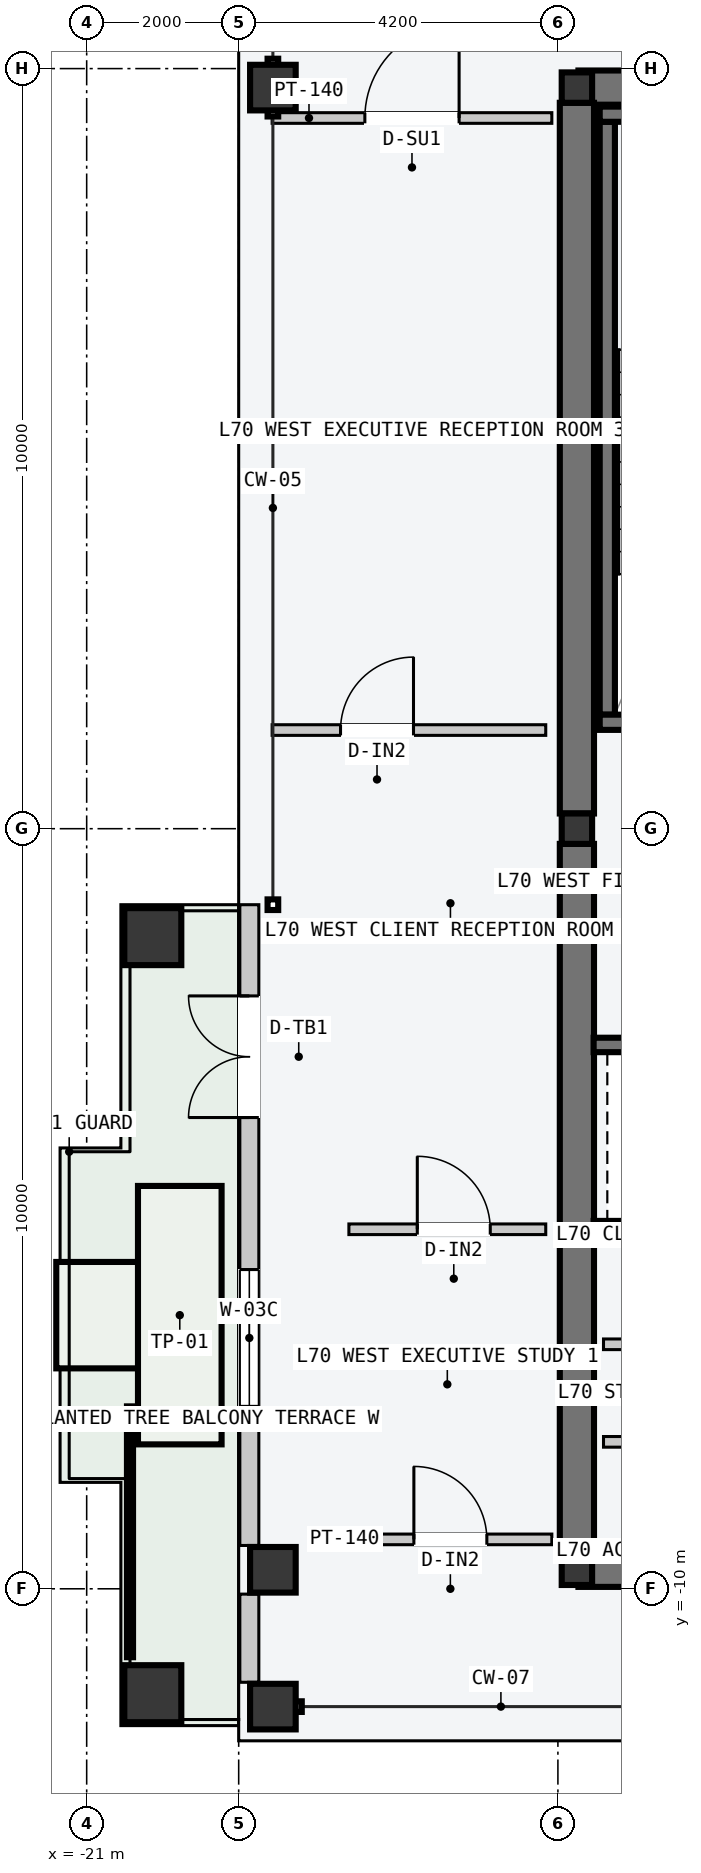
"""IFC4 building model, lengths in metres.
Left out: names, types, materials, properties, quantities, classifications, styles, units other than length and angle.
Written with IfcOpenShell. Run it as: python <this file> out.ifc"""

import sys

from ifc_helpers import new_model, si_unit, direction, frame, frame_2d, origin, origin_2d, place, context, subcontext, project, spatial, rectangle, hollow_rectangle, i_section, extrude, element, fill, save


model = new_model("IFC4")
c1 = context("Model", 3, precision=1e-05, world=origin(), true_north=direction((0.0, 1.0)))
c2 = subcontext(c1, "Body", "Model", "MODEL_VIEW")
j1 = project(units=[si_unit("LENGTHUNIT", "METRE"), si_unit("PLANEANGLEUNIT", "RADIAN")], contexts=[c1])
p1 = place(None, origin())
s1 = spatial("IfcSite", under=j1, at=p1, CompositionType="ELEMENT")
p2 = place(p1, origin())
s2 = spatial("IfcBuilding", under=s1, at=p2, CompositionType="ELEMENT")
p3 = place(p2, frame((0.0, 0.0, 265.2)))
s3 = spatial("IfcBuildingStorey", under=s2, at=p3, CompositionType="ELEMENT", Elevation=265.2)
for number, where, z_axis, x_axis in (
    (1, (-14.53, -9.75, -0.2), (0.0, 0.0, 1.0), (1.0, 0.0, 0.0)),
    (2, (-14.53, 9.75, -0.2), (0.0, 0.0, 1.0), (1.0, 0.0, 0.0)),
):
    element("IfcWall", number, at=place(p3, frame(where, z_axis=z_axis, x_axis=x_axis)), inside=s3, PredefinedType="SHEAR", context=c2, shape_type="SweptSolid", body=[
        extrude(rectangle(XDim=6.46, YDim=0.45, at=frame_2d((3.23, 0.0))), origin(), (0.0, 0.0, 1.0), 3.6),
    ])
for number, where, z_axis, x_axis in (
    (3, (-14.55, -9.55, -0.2), (0.0, 0.0, 1.0), (0.0, 1.0, 0.0)),
    (4, (-14.55, 0.2, -0.2), (0.0, 0.0, 1.0), (0.0, 1.0, 0.0)),
):
    element("IfcWall", number, at=place(p3, frame(where, z_axis=z_axis, x_axis=x_axis)), inside=s3, PredefinedType="SHEAR", context=c2, shape_type="SweptSolid", body=[
        extrude(rectangle(XDim=9.35, YDim=0.45, at=frame_2d((4.675, 0.0))), origin(), (0.0, 0.0, 1.0), 3.6),
    ])
p4 = place(p3, frame((-14.15, 1.5, -0.2), z_axis=(0.0, 0.0, 1.0), x_axis=(0.0, 1.0, 0.0)))
e5 = element("IfcWall", 5, at=p4, inside=s3, PredefinedType="SOLIDWALL", context=c2, shape_type="SweptSolid", body=[
    extrude(rectangle(XDim=7.8, YDim=0.2, at=frame_2d((3.9, 0.0))), origin(), (0.0, 0.0, 1.0), 3.6),
])
p5 = place(p3, frame((-14.25, 1.4, -0.2), z_axis=(0.0, 0.0, 1.0), x_axis=(1.0, 0.0, 0.0)))
e6 = element("IfcWall", 6, at=p5, inside=s3, PredefinedType="SOLIDWALL", context=c2, shape_type="SweptSolid", body=[
    extrude(rectangle(XDim=3.72, YDim=0.2, at=frame_2d((1.86, 0.0))), origin(), (0.0, 0.0, 1.0), 3.6),
])
p6 = place(p5, frame((1.5, 0.0, 0.2)))
e7 = element("IfcOpeningElement", 7, at=p6, cuts=e6, PredefinedType="OPENING", context=c2, shape_type="SweptSolid", body=[
    extrude(rectangle(XDim=1.12, YDim=2.18, at=frame_2d((0.56, 1.09))), frame((0.0, 0.11, 0.0), z_axis=(0.0, -1.0, 0.0), x_axis=(1.0, 0.0, 0.0)), (0.0, 0.0, 1.0), 0.22),
])
p7 = place(p3, frame((-14.25, 9.4, -0.2), z_axis=(0.0, 0.0, 1.0), x_axis=(1.0, 0.0, 0.0)))
e8 = element("IfcWall", 8, at=p7, inside=s3, PredefinedType="SOLIDWALL", context=c2, shape_type="SweptSolid", body=[
    extrude(rectangle(XDim=3.72, YDim=0.2, at=frame_2d((1.86, 0.0))), origin(), (0.0, 0.0, 1.0), 3.6),
])
for number, where, z_axis, x_axis in (
    (9, (-14.55, -9.75, 0.0), (0.0, 0.0, 1.0), (1.0, 0.0, 0.0)),
    (10, (-14.55, 0.0, 0.0), (0.0, 0.0, 1.0), (1.0, 0.0, 0.0)),
    (11, (-14.55, 9.75, 0.0), (0.0, 0.0, 1.0), (1.0, 0.0, 0.0)),
):
    element("IfcColumn", number, at=place(p3, frame(where, z_axis=z_axis, x_axis=x_axis)), inside=s3, PredefinedType="COLUMN", context=c2, shape_type="SweptSolid", body=[
        extrude(i_section(OverallWidth=0.4, OverallDepth=0.4, WebThickness=0.013, FlangeThickness=0.021, at=origin_2d()), origin(), (0.0, 0.0, 1.0), 3.6),
    ])
for number, where, z_axis, x_axis in (
    (12, (-18.55, -11.55, 0.0), (0.0, 0.0, 1.0), (0.0, 1.0, 0.0)),
    (13, (-18.55, -9.75, 0.0), (0.0, 0.0, 1.0), (0.0, 1.0, 0.0)),
    (14, (-18.55, 9.75, 0.0), (0.0, 0.0, 1.0), (0.0, 1.0, 0.0)),
):
    element("IfcColumn", number, at=place(p3, frame(where, z_axis=z_axis, x_axis=x_axis)), inside=s3, PredefinedType="COLUMN", context=c2, shape_type="SweptSolid", body=[
        extrude(hollow_rectangle(XDim=0.6, YDim=0.6, WallThickness=0.025, at=origin_2d()), origin(), (0.0, 0.0, 1.0), 3.6),
    ])
for number, where, z_axis, x_axis in (
    (15, (-20.13, -11.38, 0.0), (0.0, 0.0, 1.0), (0.0, 1.0, 0.0)),
    (16, (-20.13, -1.42, 0.0), (0.0, 0.0, 1.0), (0.0, 1.0, 0.0)),
):
    element("IfcColumn", number, at=place(p3, frame(where, z_axis=z_axis, x_axis=x_axis)), inside=s3, PredefinedType="COLUMN", context=c2, shape_type="SweptSolid", body=[
        extrude(hollow_rectangle(XDim=0.75, YDim=0.75, WallThickness=0.032, at=origin_2d()), origin(), (0.0, 0.0, 1.0), 3.6),
    ])
p8 = place(p3, frame((-18.86, -11.23, 0.0), z_axis=(0.0, 0.0, 1.0), x_axis=(0.0, 1.0, 0.0)))
e17 = element("IfcWall", 17, at=p8, inside=s3, PredefinedType="STANDARD", context=c2, shape_type="SweptSolid", body=[
    extrude(rectangle(XDim=1.16, YDim=0.25, at=frame_2d((0.58, 0.0))), origin(), (0.0, 0.0, 1.0), 3.4),
])
p9 = place(p3, frame((-18.86, -9.43, 0.0), z_axis=(0.0, 0.0, 1.0), x_axis=(0.0, 1.0, 0.0)))
e18 = element("IfcWall", 18, at=p9, inside=s3, PredefinedType="STANDARD", context=c2, shape_type="SweptSolid", body=[
    extrude(rectangle(XDim=8.43, YDim=0.25, at=frame_2d((4.215, 0.0))), origin(), (0.0, 0.0, 1.0), 3.4),
])
p10 = place(p9, frame((5.63, 0.0, 0.0)))
e19 = element("IfcOpeningElement", 19, at=p10, cuts=e18, PredefinedType="OPENING", context=c2, shape_type="SweptSolid", body=[
    extrude(rectangle(XDim=1.6, YDim=2.2, at=frame_2d((0.8, 1.1))), frame((0.0, 0.135, 0.0), z_axis=(0.0, -1.0, 0.0), x_axis=(1.0, 0.0, 0.0)), (0.0, 0.0, 1.0), 0.27),
])
p11 = place(p9, frame((1.83, 0.0, 0.85)))
e20 = element("IfcOpeningElement", 20, at=p11, cuts=e18, PredefinedType="OPENING", context=c2, shape_type="SweptSolid", body=[
    extrude(rectangle(XDim=1.8, YDim=2.05, at=frame_2d((0.9, 1.025))), frame((0.0, 0.135, 0.0), z_axis=(0.0, -1.0, 0.0), x_axis=(1.0, 0.0, 0.0)), (0.0, 0.0, 1.0), 0.27),
])
p12 = place(p3, frame((-14.33, -2.845, -0.2), z_axis=(0.0, 0.0, 1.0), x_axis=(1.0, 0.0, 0.0)))
e21 = element("IfcWall", 21, at=p12, inside=s3, PredefinedType="SOLIDWALL", context=c2, shape_type="SweptSolid", body=[
    extrude(rectangle(XDim=2.68, YDim=0.19, at=frame_2d((1.34, 0.0))), origin(), (0.0, 0.0, 1.0), 3.6),
])
p13 = place(p12, frame((0.83, 0.0, 0.2)))
e22 = element("IfcOpeningElement", 22, at=p13, cuts=e21, PredefinedType="OPENING", context=c2, shape_type="SweptSolid", body=[
    extrude(rectangle(XDim=1.2, YDim=2.2, at=frame_2d((0.6, 1.1))), frame((0.0, 0.105, 0.0), z_axis=(0.0, -1.0, 0.0), x_axis=(1.0, 0.0, 0.0)), (0.0, 0.0, 1.0), 0.21),
])
p14 = place(p3, frame((-14.33, -5.255, -0.2), z_axis=(0.0, 0.0, 1.0), x_axis=(1.0, 0.0, 0.0)))
e23 = element("IfcWall", 23, at=p14, inside=s3, PredefinedType="SOLIDWALL", context=c2, shape_type="SweptSolid", body=[
    extrude(rectangle(XDim=2.68, YDim=0.19, at=frame_2d((1.34, 0.0))), origin(), (0.0, 0.0, 1.0), 3.6),
])
for number, where, z_axis, x_axis in (
    (24, (-11.7, -8.067, 0.0), (0.0, 0.0, 1.0), (-1.0, 0.0, 0.0)),
    (25, (-11.7, -6.783, 0.0), (0.0, 0.0, 1.0), (-1.0, 0.0, 0.0)),
):
    element("IfcWall", number, at=place(p3, frame(where, z_axis=z_axis, x_axis=x_axis)), inside=s3, PredefinedType="PARTITIONING", context=c2, shape_type="SweptSolid", body=[
        extrude(rectangle(XDim=2.5, YDim=0.14, at=frame_2d((1.25, 0.0))), origin(), (0.0, 0.0, 1.0), 3.4),
    ])
p15 = place(p3, frame((-18.56, 9.35, 0.0), z_axis=(0.0, 0.0, 1.0), x_axis=(1.0, 0.0, 0.0)))
e26 = element("IfcWall", 26, at=p15, inside=s3, PredefinedType="PARTITIONING", context=c2, shape_type="SweptSolid", body=[
    extrude(rectangle(XDim=3.68, YDim=0.14, at=frame_2d((1.84, 0.0))), origin(), (0.0, 0.0, 1.0), 3.4),
])
p16 = place(p15, frame((1.22, 0.0, 0.0)))
e27 = element("IfcOpeningElement", 27, at=p16, cuts=e26, PredefinedType="OPENING", context=c2, shape_type="SweptSolid", body=[
    extrude(rectangle(XDim=1.24, YDim=2.24, at=frame_2d((0.62, 1.12))), frame((0.0, 0.08, 0.0), z_axis=(0.0, -1.0, 0.0), x_axis=(1.0, 0.0, 0.0)), (0.0, 0.0, 1.0), 0.16),
])
p17 = place(p3, frame((-17.55, -9.35, 0.0), z_axis=(0.0, 0.0, 1.0), x_axis=(1.0, 0.0, 0.0)))
e28 = element("IfcWall", 28, at=p17, inside=s3, PredefinedType="PARTITIONING", context=c2, shape_type="SweptSolid", body=[
    extrude(rectangle(XDim=2.67, YDim=0.14, at=frame_2d((1.335, 0.0))), origin(), (0.0, 0.0, 1.0), 3.4),
])
p18 = place(p17, frame((0.855, 0.0, 0.0)))
e29 = element("IfcOpeningElement", 29, at=p18, cuts=e28, PredefinedType="OPENING", context=c2, shape_type="SweptSolid", body=[
    extrude(rectangle(XDim=0.96, YDim=2.18, at=frame_2d((0.48, 1.09))), frame((0.0, 0.08, 0.0), z_axis=(0.0, -1.0, 0.0), x_axis=(1.0, 0.0, 0.0)), (0.0, 0.0, 1.0), 0.16),
])
p19 = place(p3, frame((-17.55, -5.27, 0.0), z_axis=(0.0, 0.0, 1.0), x_axis=(1.0, 0.0, 0.0)))
e30 = element("IfcWall", 30, at=p19, inside=s3, PredefinedType="PARTITIONING", context=c2, shape_type="SweptSolid", body=[
    extrude(rectangle(XDim=2.59, YDim=0.14, at=frame_2d((1.295, 0.0))), origin(), (0.0, 0.0, 1.0), 3.4),
])
p20 = place(p19, frame((0.9, 0.0, 0.0)))
e31 = element("IfcOpeningElement", 31, at=p20, cuts=e30, PredefinedType="OPENING", context=c2, shape_type="SweptSolid", body=[
    extrude(rectangle(XDim=0.96, YDim=2.18, at=frame_2d((0.48, 1.09))), frame((0.0, 0.08, 0.0), z_axis=(0.0, -1.0, 0.0), x_axis=(1.0, 0.0, 0.0)), (0.0, 0.0, 1.0), 0.16),
])
p21 = place(p3, frame((-18.56, 1.298, 0.0), z_axis=(0.0, 0.0, 1.0), x_axis=(1.0, 0.0, 0.0)))
e32 = element("IfcWall", 32, at=p21, inside=s3, PredefinedType="PARTITIONING", context=c2, shape_type="SweptSolid", body=[
    extrude(rectangle(XDim=3.6, YDim=0.14, at=frame_2d((1.8, 0.0))), origin(), (0.0, 0.0, 1.0), 3.4),
])
p22 = place(p21, frame((0.9, 0.0, 0.0)))
e33 = element("IfcOpeningElement", 33, at=p22, cuts=e32, PredefinedType="OPENING", context=c2, shape_type="SweptSolid", body=[
    extrude(rectangle(XDim=0.96, YDim=2.18, at=frame_2d((0.48, 1.09))), frame((0.0, 0.08, 0.0), z_axis=(0.0, -1.0, 0.0), x_axis=(1.0, 0.0, 0.0)), (0.0, 0.0, 1.0), 0.16),
])
p23 = place(p10, origin())
e34 = element("IfcDoor", 34, at=p23, inside=s3, OperationType="DOUBLE_DOOR_SINGLE_SWING", PredefinedType="DOOR", context=c2, shape_type="SweptSolid", body=[
    extrude(rectangle(XDim=1.6, YDim=2.2, at=frame_2d((0.8, 1.1))), frame((0.0, 0.025, 0.0), z_axis=(0.0, -1.0, 0.0), x_axis=(1.0, 0.0, 0.0)), (0.0, 0.0, 1.0), 0.05),
])
fill(e19, e34)
p24 = place(p11, origin())
e35 = element("IfcWindow", 35, at=p24, inside=s3, PartitioningType="SINGLE_PANEL", PredefinedType="WINDOW", context=c2, shape_type="SweptSolid", body=[
    extrude(rectangle(XDim=1.8, YDim=2.05, at=frame_2d((0.9, 1.025))), frame((0.0, 0.03, 0.0), z_axis=(0.0, -1.0, 0.0), x_axis=(1.0, 0.0, 0.0)), (0.0, 0.0, 1.0), 0.06),
])
fill(e20, e35)
p25 = place(p16, origin())
e36 = element("IfcDoor", 36, at=p25, inside=s3, OperationType="SINGLE_SWING_RIGHT", PredefinedType="DOOR", context=c2, shape_type="SweptSolid", body=[
    extrude(rectangle(XDim=1.24, YDim=2.24, at=frame_2d((0.62, 1.12))), frame((0.0, 0.025, 0.0), z_axis=(0.0, -1.0, 0.0), x_axis=(1.0, 0.0, 0.0)), (0.0, 0.0, 1.0), 0.05),
])
fill(e27, e36)
p26 = place(p18, origin())
e37 = element("IfcDoor", 37, at=p26, inside=s3, OperationType="SINGLE_SWING_LEFT", PredefinedType="DOOR", context=c2, shape_type="SweptSolid", body=[
    extrude(rectangle(XDim=0.96, YDim=2.18, at=frame_2d((0.48, 1.09))), frame((0.0, 0.025, 0.0), z_axis=(0.0, -1.0, 0.0), x_axis=(1.0, 0.0, 0.0)), (0.0, 0.0, 1.0), 0.05),
])
fill(e29, e37)
p27 = place(p20, origin())
e38 = element("IfcDoor", 38, at=p27, inside=s3, OperationType="SINGLE_SWING_LEFT", PredefinedType="DOOR", context=c2, shape_type="SweptSolid", body=[
    extrude(rectangle(XDim=0.96, YDim=2.18, at=frame_2d((0.48, 1.09))), frame((0.0, 0.025, 0.0), z_axis=(0.0, -1.0, 0.0), x_axis=(1.0, 0.0, 0.0)), (0.0, 0.0, 1.0), 0.05),
])
fill(e31, e38)
p28 = place(p22, origin())
e39 = element("IfcDoor", 39, at=p28, inside=s3, OperationType="SINGLE_SWING_RIGHT", PredefinedType="DOOR", context=c2, shape_type="SweptSolid", body=[
    extrude(rectangle(XDim=0.96, YDim=2.18, at=frame_2d((0.48, 1.09))), frame((0.0, 0.025, 0.0), z_axis=(0.0, -1.0, 0.0), x_axis=(1.0, 0.0, 0.0)), (0.0, 0.0, 1.0), 0.05),
])
fill(e33, e39)
save(model, sys.argv[1])
